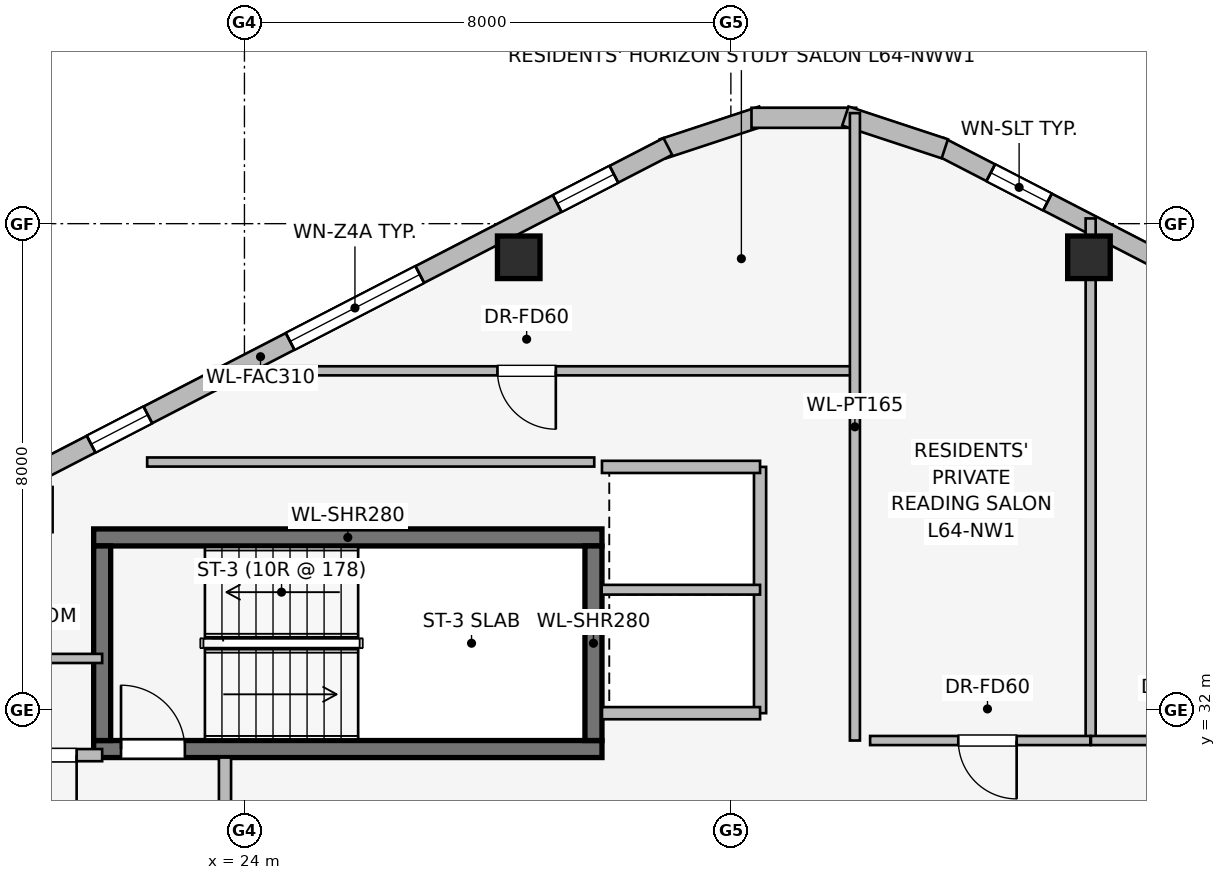
"""IFC4 building model, lengths in metres.
Left out: names, types, materials, properties, quantities, classifications, styles, units other than length and angle.
Written with IfcOpenShell. Run it as: python <this file> out.ifc"""

import sys

from ifc_helpers import new_model, si_unit, direction, frame, frame_2d, origin, origin_2d, place, context, subcontext, project, spatial, rectangle, extrude, element, fill, save


model = new_model("IFC4")
c1 = context("Model", 3, precision=1e-05, world=origin(), true_north=direction((0.0, 1.0)))
c2 = subcontext(c1, "Body", "Model", "MODEL_VIEW")
j1 = project(units=[si_unit("LENGTHUNIT", "METRE"), si_unit("PLANEANGLEUNIT", "RADIAN")], contexts=[c1])
p1 = place(None, origin())
s1 = spatial("IfcSite", under=j1, at=p1, CompositionType="ELEMENT")
p2 = place(p1, origin())
s2 = spatial("IfcBuilding", under=s1, at=p2, CompositionType="ELEMENT")
p3 = place(p2, frame((0.0, 0.0, 234.8)))
s3 = spatial("IfcBuildingStorey", under=s2, at=p3, CompositionType="ELEMENT", Elevation=234.8)
p4 = place(p3, frame((21.52, 31.36, 0.0), z_axis=(0.0, 0.0, 1.0), x_axis=(1.0, 0.0, 0.0)))
e1 = element("IfcWall", 1, at=p4, inside=s3, PredefinedType="SHEAR", context=c2, shape_type="SweptSolid", body=[
    extrude(rectangle(XDim=8.36, YDim=0.28, at=frame_2d((4.18, 0.0))), origin(), (0.0, 0.0, 1.0), 3.55),
])
p5 = place(p4, frame((0.45, 0.0, 0.0)))
e2 = element("IfcOpeningElement", 2, at=p5, cuts=e1, PredefinedType="OPENING", context=c2, shape_type="SweptSolid", body=[
    extrude(rectangle(XDim=1.05, YDim=2.0, at=frame_2d((0.525, 1.0))), frame((0.0, 0.15, 0.0), z_axis=(0.0, -1.0, 0.0), x_axis=(1.0, 0.0, 0.0)), (0.0, 0.0, 1.0), 0.3),
])
p6 = place(p3, frame((29.88, 34.84, 0.0), z_axis=(0.0, 0.0, 1.0), x_axis=(-1.0, 0.0, 0.0)))
e3 = element("IfcWall", 3, at=p6, inside=s3, PredefinedType="SHEAR", context=c2, shape_type="SweptSolid", body=[
    extrude(rectangle(XDim=8.36, YDim=0.28, at=frame_2d((4.18, 0.0))), origin(), (0.0, 0.0, 1.0), 3.55),
])
for number, where, z_axis, x_axis in (
    (4, (21.66, 34.7, 0.0), (0.0, 0.0, 1.0), (0.0, -1.0, 0.0)),
    (5, (29.74, 31.5, 0.0), (0.0, 0.0, 1.0), (0.0, 1.0, 0.0)),
):
    element("IfcWall", number, at=place(p3, frame(where, z_axis=z_axis, x_axis=x_axis)), inside=s3, PredefinedType="SHEAR", context=c2, shape_type="SweptSolid", body=[
        extrude(rectangle(XDim=3.2, YDim=0.28, at=frame_2d((1.6, 0.0))), origin(), (0.0, 0.0, 1.0), 3.55),
    ])
for number, where, z_axis, x_axis in (
    (6, (37.889, 39.447, 0.0), (0.0, 0.0, 1.0), (1.0, 0.0, 0.0)),
    (7, (28.511, 39.447, 0.0), (0.0, 0.0, 1.0), (1.0, 0.0, 0.0)),
):
    element("IfcColumn", number, at=place(p3, frame(where, z_axis=z_axis, x_axis=x_axis)), inside=s3, PredefinedType="COLUMN", context=c2, shape_type="SweptSolid", body=[
        extrude(rectangle(XDim=0.7, YDim=0.7, at=origin_2d()), origin(), (0.0, 0.0, 1.0), 3.55),
    ])
p7 = place(p3, frame((35.437, 41.27, 0.0), z_axis=(0.0, 0.0, 1.0), x_axis=(0.888581481622, -0.458718814218, 0.0)))
e8 = element("IfcWall", 8, at=p7, inside=s3, PredefinedType="STANDARD", context=c2, shape_type="SweptSolid", body=[
    extrude(rectangle(XDim=15.077, YDim=0.31, at=frame_2d((7.539, 0.0))), origin(), (0.0, 0.0, 1.0), 3.26),
])
p8 = place(p7, frame((0.942, 0.0, 0.75)))
e9 = element("IfcOpeningElement", 9, at=p8, cuts=e8, PredefinedType="OPENING", context=c2, shape_type="SweptSolid", body=[
    extrude(rectangle(XDim=1.05, YDim=1.4, at=frame_2d((0.525, 0.7))), frame((0.0, 0.165, 0.0), z_axis=(0.0, -1.0, 0.0), x_axis=(1.0, 0.0, 0.0)), (0.0, 0.0, 1.0), 0.33),
])
p9 = place(p7, frame((4.344, 0.0, 0.75)))
e10 = element("IfcOpeningElement", 10, at=p9, cuts=e8, PredefinedType="OPENING", context=c2, shape_type="SweptSolid", body=[
    extrude(rectangle(XDim=1.05, YDim=1.4, at=frame_2d((0.525, 0.7))), frame((0.0, 0.165, 0.0), z_axis=(0.0, -1.0, 0.0), x_axis=(1.0, 0.0, 0.0)), (0.0, 0.0, 1.0), 0.33),
])
p10 = place(p7, frame((7.013, 0.0, 0.75)))
e11 = element("IfcOpeningElement", 11, at=p10, cuts=e8, PredefinedType="OPENING", context=c2, shape_type="SweptSolid", body=[
    extrude(rectangle(XDim=1.05, YDim=1.4, at=frame_2d((0.525, 0.7))), frame((0.0, 0.165, 0.0), z_axis=(0.0, -1.0, 0.0), x_axis=(1.0, 0.0, 0.0)), (0.0, 0.0, 1.0), 0.33),
])
p11 = place(p7, frame((9.681, 0.0, 0.75)))
e12 = element("IfcOpeningElement", 12, at=p11, cuts=e8, PredefinedType="OPENING", context=c2, shape_type="SweptSolid", body=[
    extrude(rectangle(XDim=1.05, YDim=1.4, at=frame_2d((0.525, 0.7))), frame((0.0, 0.165, 0.0), z_axis=(0.0, -1.0, 0.0), x_axis=(1.0, 0.0, 0.0)), (0.0, 0.0, 1.0), 0.33),
])
p12 = place(p7, frame((13.029, 0.0, 0.75)))
e13 = element("IfcOpeningElement", 13, at=p12, cuts=e8, PredefinedType="OPENING", context=c2, shape_type="SweptSolid", body=[
    extrude(rectangle(XDim=1.05, YDim=1.4, at=frame_2d((0.525, 0.7))), frame((0.0, 0.165, 0.0), z_axis=(0.0, -1.0, 0.0), x_axis=(1.0, 0.0, 0.0)), (0.0, 0.0, 1.0), 0.33),
])
p13 = place(p3, frame((30.882, 41.231, 0.0), z_axis=(0.0, 0.0, 1.0), x_axis=(0.949713440491, 0.313120393699, 0.0)))
e14 = element("IfcWall", 14, at=p13, inside=s3, PredefinedType="STANDARD", context=c2, shape_type="SweptSolid", body=[
    extrude(rectangle(XDim=1.722, YDim=0.33, at=frame_2d((0.861, 0.0))), origin(), (0.0, 0.0, 1.0), 3.26),
])
p14 = place(p3, frame((32.339, 41.741, 0.0), z_axis=(0.0, 0.0, 1.0), x_axis=(1.0, 0.0, 0.0)))
e15 = element("IfcWall", 15, at=p14, inside=s3, PredefinedType="STANDARD", context=c2, shape_type="SweptSolid", body=[
    extrude(rectangle(XDim=1.722, YDim=0.33, at=frame_2d((0.861, 0.0))), origin(), (0.0, 0.0, 1.0), 3.26),
])
p15 = place(p3, frame((33.883, 41.77, 0.0), z_axis=(0.0, 0.0, 1.0), x_axis=(0.949713440491, -0.313120393699, 0.0)))
e16 = element("IfcWall", 16, at=p15, inside=s3, PredefinedType="STANDARD", context=c2, shape_type="SweptSolid", body=[
    extrude(rectangle(XDim=1.722, YDim=0.33, at=frame_2d((0.861, 0.0))), origin(), (0.0, 0.0, 1.0), 3.26),
])
p16 = place(p3, frame((17.566, 34.354, 0.0), z_axis=(0.0, 0.0, 1.0), x_axis=(0.888581481622, 0.458718814218, 0.0)))
e17 = element("IfcWall", 17, at=p16, inside=s3, PredefinedType="STANDARD", context=c2, shape_type="SweptSolid", body=[
    extrude(rectangle(XDim=15.077, YDim=0.31, at=frame_2d((7.539, 0.0))), origin(), (0.0, 0.0, 1.0), 3.26),
])
p17 = place(p16, frame((0.998, 0.0, 0.75)))
e18 = element("IfcOpeningElement", 18, at=p17, cuts=e17, PredefinedType="OPENING", context=c2, shape_type="SweptSolid", body=[
    extrude(rectangle(XDim=1.05, YDim=1.4, at=frame_2d((0.525, 0.7))), frame((0.0, 0.165, 0.0), z_axis=(0.0, -1.0, 0.0), x_axis=(1.0, 0.0, 0.0)), (0.0, 0.0, 1.0), 0.33),
])
p18 = place(p16, frame((4.403, 0.0, 0.75)))
e19 = element("IfcOpeningElement", 19, at=p18, cuts=e17, PredefinedType="OPENING", context=c2, shape_type="SweptSolid", body=[
    extrude(rectangle(XDim=1.05, YDim=1.4, at=frame_2d((0.525, 0.7))), frame((0.0, 0.165, 0.0), z_axis=(0.0, -1.0, 0.0), x_axis=(1.0, 0.0, 0.0)), (0.0, 0.0, 1.0), 0.33),
])
p19 = place(p16, frame((8.086, 0.0, 0.75)))
e20 = element("IfcOpeningElement", 20, at=p19, cuts=e17, PredefinedType="OPENING", context=c2, shape_type="SweptSolid", body=[
    extrude(rectangle(XDim=2.4, YDim=1.6, at=frame_2d((1.2, 0.8))), frame((0.0, 0.165, 0.0), z_axis=(0.0, -1.0, 0.0), x_axis=(1.0, 0.0, 0.0)), (0.0, 0.0, 1.0), 0.33),
])
p20 = place(p16, frame((13.029, 0.0, 0.75)))
e21 = element("IfcOpeningElement", 21, at=p20, cuts=e17, PredefinedType="OPENING", context=c2, shape_type="SweptSolid", body=[
    extrude(rectangle(XDim=1.05, YDim=1.4, at=frame_2d((0.525, 0.7))), frame((0.0, 0.165, 0.0), z_axis=(0.0, -1.0, 0.0), x_axis=(1.0, 0.0, 0.0)), (0.0, 0.0, 1.0), 0.33),
])
p21 = place(p3, frame((23.68, 25.68, 0.0), z_axis=(0.0, 0.0, 1.0), x_axis=(0.0, 1.0, 0.0)))
e22 = element("IfcWall", 22, at=p21, inside=s3, PredefinedType="PARTITIONING", context=c2, shape_type="SweptSolid", body=[
    extrude(rectangle(XDim=5.54, YDim=0.2, at=frame_2d((2.77, 0.0))), origin(), (0.0, 0.0, 1.0), 3.26),
])
p22 = place(p21, frame((1.8, 0.0, 0.0)))
e23 = element("IfcOpeningElement", 23, at=p22, cuts=e22, PredefinedType="OPENING", context=c2, shape_type="SweptSolid", body=[
    extrude(rectangle(XDim=1.05, YDim=2.0, at=frame_2d((0.525, 1.0))), frame((0.0, 0.11, 0.0), z_axis=(0.0, -1.0, 0.0), x_axis=(1.0, 0.0, 0.0)), (0.0, 0.0, 1.0), 0.22),
])
p23 = place(p3, frame((21.66, 31.26, 0.0), z_axis=(0.0, 0.0, 1.0), x_axis=(-1.0, 0.0, 0.0)))
e24 = element("IfcWall", 24, at=p23, inside=s3, PredefinedType="PARTITIONING", context=c2, shape_type="SweptSolid", body=[
    extrude(rectangle(XDim=2.01, YDim=0.2, at=frame_2d((1.005, 0.0))), origin(), (0.0, 0.0, 1.0), 3.26),
])
p24 = place(p23, frame((0.42, 0.0, 0.0)))
e25 = element("IfcOpeningElement", 25, at=p24, cuts=e24, PredefinedType="OPENING", context=c2, shape_type="SweptSolid", body=[
    extrude(rectangle(XDim=0.86, YDim=2.0, at=frame_2d((0.43, 1.0))), frame((0.0, 0.11, 0.0), z_axis=(0.0, -1.0, 0.0), x_axis=(1.0, 0.0, 0.0)), (0.0, 0.0, 1.0), 0.22),
])
p25 = place(p3, frame((32.48, 31.95, 0.0), z_axis=(0.0, 0.0, 1.0), x_axis=(0.0, 1.0, 0.0)))
e26 = element("IfcWall", 26, at=p25, inside=s3, PredefinedType="PARTITIONING", context=c2, shape_type="SweptSolid", body=[
    extrude(rectangle(XDim=4.05, YDim=0.2, at=frame_2d((2.025, 0.0))), origin(), (0.0, 0.0, 1.0), 3.26),
])
p26 = place(p3, frame((29.88, 36.0, 0.0), z_axis=(0.0, 0.0, 1.0), x_axis=(1.0, 0.0, 0.0)))
e27 = element("IfcWall", 27, at=p26, inside=s3, PredefinedType="PARTITIONING", context=c2, shape_type="SweptSolid", body=[
    extrude(rectangle(XDim=2.6, YDim=0.2, at=frame_2d((1.3, 0.0))), origin(), (0.0, 0.0, 1.0), 3.26),
])
p27 = place(p3, frame((32.48, 31.95, 0.0), z_axis=(0.0, 0.0, 1.0), x_axis=(-1.0, 0.0, 0.0)))
e28 = element("IfcWall", 28, at=p27, inside=s3, PredefinedType="PARTITIONING", context=c2, shape_type="SweptSolid", body=[
    extrude(rectangle(XDim=2.6, YDim=0.2, at=frame_2d((1.3, 0.0))), origin(), (0.0, 0.0, 1.0), 2.652),
])
p28 = place(p3, frame((29.875, 33.98, 0.0), z_axis=(0.0, 0.0, 1.0), x_axis=(1.0, 0.0, 0.0)))
e29 = element("IfcWall", 29, at=p28, inside=s3, PredefinedType="PARTITIONING", context=c2, shape_type="SweptSolid", body=[
    extrude(rectangle(XDim=2.605, YDim=0.16, at=frame_2d((1.302, 0.0))), origin(), (0.0, 0.0, 1.0), 3.26),
])
p29 = place(p3, frame((21.66, 32.85, 0.0), z_axis=(0.0, 0.0, 1.0), x_axis=(-1.0, 0.0, 0.0)))
e30 = element("IfcWall", 30, at=p29, inside=s3, PredefinedType="PARTITIONING", context=c2, shape_type="SweptSolid", body=[
    extrude(rectangle(XDim=1.71, YDim=0.15, at=frame_2d((0.855, 0.0))), origin(), (0.0, 0.0, 1.0), 3.26),
])
p30 = place(p3, frame((34.0, 37.58, 0.0), z_axis=(0.0, 0.0, 1.0), x_axis=(-1.0, 0.0, 0.0)))
e31 = element("IfcWall", 31, at=p30, inside=s3, PredefinedType="PARTITIONING", context=c2, shape_type="SweptSolid", body=[
    extrude(rectangle(XDim=10.501, YDim=0.15, at=frame_2d((5.25, 0.0))), origin(), (0.0, 0.0, 1.0), 3.26),
])
p31 = place(p30, frame((4.879, 0.0, 0.0)))
e32 = element("IfcOpeningElement", 32, at=p31, cuts=e31, PredefinedType="OPENING", context=c2, shape_type="SweptSolid", body=[
    extrude(rectangle(XDim=0.96, YDim=2.0, at=frame_2d((0.48, 1.0))), frame((0.0, 0.085, 0.0), z_axis=(0.0, -1.0, 0.0), x_axis=(1.0, 0.0, 0.0)), (0.0, 0.0, 1.0), 0.17),
])
p32 = place(p3, frame((34.04, 31.5, 0.0), z_axis=(0.0, 0.0, 1.0), x_axis=(0.0, 1.0, 0.0)))
e33 = element("IfcWall", 33, at=p32, inside=s3, PredefinedType="PARTITIONING", context=c2, shape_type="SweptSolid", body=[
    extrude(rectangle(XDim=10.318, YDim=0.165, at=frame_2d((5.159, 0.0))), origin(), (0.0, 0.0, 1.0), 3.26),
])
p33 = place(p3, frame((37.917, 31.51, 0.0), z_axis=(0.0, 0.0, 1.0), x_axis=(0.0, 1.0, 0.0)))
e34 = element("IfcWall", 34, at=p33, inside=s3, PredefinedType="PARTITIONING", context=c2, shape_type="SweptSolid", body=[
    extrude(rectangle(XDim=8.576, YDim=0.165, at=frame_2d((4.288, 0.0))), origin(), (0.0, 0.0, 1.0), 2.649),
])
p34 = place(p3, frame((37.912, 31.5, 0.0), z_axis=(0.0, 0.0, 1.0), x_axis=(-1.0, 0.0, 0.0)))
e35 = element("IfcWall", 35, at=p34, inside=s3, PredefinedType="PARTITIONING", context=c2, shape_type="SweptSolid", body=[
    extrude(rectangle(XDim=3.622, YDim=0.15, at=frame_2d((1.811, 0.0))), origin(), (0.0, 0.0, 1.0), 3.26),
])
p35 = place(p34, frame((1.212, 0.0, 0.0)))
e36 = element("IfcOpeningElement", 36, at=p35, cuts=e35, PredefinedType="OPENING", context=c2, shape_type="SweptSolid", body=[
    extrude(rectangle(XDim=0.96, YDim=2.0, at=frame_2d((0.48, 1.0))), frame((0.0, 0.085, 0.0), z_axis=(0.0, -1.0, 0.0), x_axis=(1.0, 0.0, 0.0)), (0.0, 0.0, 1.0), 0.17),
])
p36 = place(p3, frame((41.45, 31.5, 0.0), z_axis=(0.0, 0.0, 1.0), x_axis=(-1.0, 0.0, 0.0)))
e37 = element("IfcWall", 37, at=p36, inside=s3, PredefinedType="PARTITIONING", context=c2, shape_type="SweptSolid", body=[
    extrude(rectangle(XDim=3.528, YDim=0.15, at=frame_2d((1.764, 0.0))), origin(), (0.0, 0.0, 1.0), 3.26),
])
p37 = place(p36, frame((1.524, 0.0, 0.0)))
e38 = element("IfcOpeningElement", 38, at=p37, cuts=e37, PredefinedType="OPENING", context=c2, shape_type="SweptSolid", body=[
    extrude(rectangle(XDim=0.96, YDim=2.0, at=frame_2d((0.48, 1.0))), frame((0.0, 0.085, 0.0), z_axis=(0.0, -1.0, 0.0), x_axis=(1.0, 0.0, 0.0)), (0.0, 0.0, 1.0), 0.17),
])
p38 = place(p3, frame((29.753, 36.08, 0.0), z_axis=(0.0, 0.0, 1.0), x_axis=(-1.0, 0.0, 0.0)))
e39 = element("IfcWall", 39, at=p38, inside=s3, PredefinedType="PARTITIONING", context=c2, shape_type="SweptSolid", body=[
    extrude(rectangle(XDim=7.353, YDim=0.15, at=frame_2d((3.677, 0.0))), origin(), (0.0, 0.0, 1.0), 3.26),
])
p39 = place(p8, origin())
e40 = element("IfcWindow", 40, at=p39, inside=s3, PartitioningType="SINGLE_PANEL", PredefinedType="WINDOW", context=c2, shape_type="SweptSolid", body=[
    extrude(rectangle(XDim=1.05, YDim=1.4, at=frame_2d((0.525, 0.7))), frame((0.0, 0.03, 0.0), z_axis=(0.0, -1.0, 0.0), x_axis=(1.0, 0.0, 0.0)), (0.0, 0.0, 1.0), 0.06),
])
fill(e9, e40)
p40 = place(p18, origin())
e41 = element("IfcWindow", 41, at=p40, inside=s3, PartitioningType="SINGLE_PANEL", PredefinedType="WINDOW", context=c2, shape_type="SweptSolid", body=[
    extrude(rectangle(XDim=1.05, YDim=1.4, at=frame_2d((0.525, 0.7))), frame((0.0, 0.03, 0.0), z_axis=(0.0, -1.0, 0.0), x_axis=(1.0, 0.0, 0.0)), (0.0, 0.0, 1.0), 0.06),
])
fill(e19, e41)
p41 = place(p19, origin())
e42 = element("IfcWindow", 42, at=p41, inside=s3, PartitioningType="SINGLE_PANEL", PredefinedType="WINDOW", context=c2, shape_type="SweptSolid", body=[
    extrude(rectangle(XDim=2.4, YDim=1.6, at=frame_2d((1.2, 0.8))), frame((0.0, 0.03, 0.0), z_axis=(0.0, -1.0, 0.0), x_axis=(1.0, 0.0, 0.0)), (0.0, 0.0, 1.0), 0.06),
])
fill(e20, e42)
p42 = place(p20, origin())
e43 = element("IfcWindow", 43, at=p42, inside=s3, PartitioningType="SINGLE_PANEL", PredefinedType="WINDOW", context=c2, shape_type="SweptSolid", body=[
    extrude(rectangle(XDim=1.05, YDim=1.4, at=frame_2d((0.525, 0.7))), frame((0.0, 0.03, 0.0), z_axis=(0.0, -1.0, 0.0), x_axis=(1.0, 0.0, 0.0)), (0.0, 0.0, 1.0), 0.06),
])
fill(e21, e43)
p43 = place(p5, origin())
e44 = element("IfcDoor", 44, at=p43, inside=s3, OperationType="SINGLE_SWING_LEFT", PredefinedType="DOOR", context=c2, shape_type="SweptSolid", body=[
    extrude(rectangle(XDim=1.05, YDim=2.0, at=frame_2d((0.525, 1.0))), frame((0.0, 0.025, 0.0), z_axis=(0.0, -1.0, 0.0), x_axis=(1.0, 0.0, 0.0)), (0.0, 0.0, 1.0), 0.05),
])
fill(e2, e44)
p44 = place(p24, origin())
e45 = element("IfcDoor", 45, at=p44, inside=s3, OperationType="SINGLE_SWING_LEFT", PredefinedType="DOOR", context=c2, shape_type="SweptSolid", body=[
    extrude(rectangle(XDim=0.86, YDim=2.0, at=frame_2d((0.43, 1.0))), frame((0.0, 0.025, 0.0), z_axis=(0.0, -1.0, 0.0), x_axis=(1.0, 0.0, 0.0)), (0.0, 0.0, 1.0), 0.05),
])
fill(e25, e45)
p45 = place(p31, origin())
e46 = element("IfcDoor", 46, at=p45, inside=s3, OperationType="SINGLE_SWING_LEFT", PredefinedType="DOOR", context=c2, shape_type="SweptSolid", body=[
    extrude(rectangle(XDim=0.96, YDim=2.0, at=frame_2d((0.48, 1.0))), frame((0.0, 0.025, 0.0), z_axis=(0.0, -1.0, 0.0), x_axis=(1.0, 0.0, 0.0)), (0.0, 0.0, 1.0), 0.05),
])
fill(e32, e46)
p46 = place(p35, origin())
e47 = element("IfcDoor", 47, at=p46, inside=s3, OperationType="SINGLE_SWING_LEFT", PredefinedType="DOOR", context=c2, shape_type="SweptSolid", body=[
    extrude(rectangle(XDim=0.96, YDim=2.0, at=frame_2d((0.48, 1.0))), frame((0.0, 0.025, 0.0), z_axis=(0.0, -1.0, 0.0), x_axis=(1.0, 0.0, 0.0)), (0.0, 0.0, 1.0), 0.05),
])
fill(e36, e47)
save(model, sys.argv[1])
